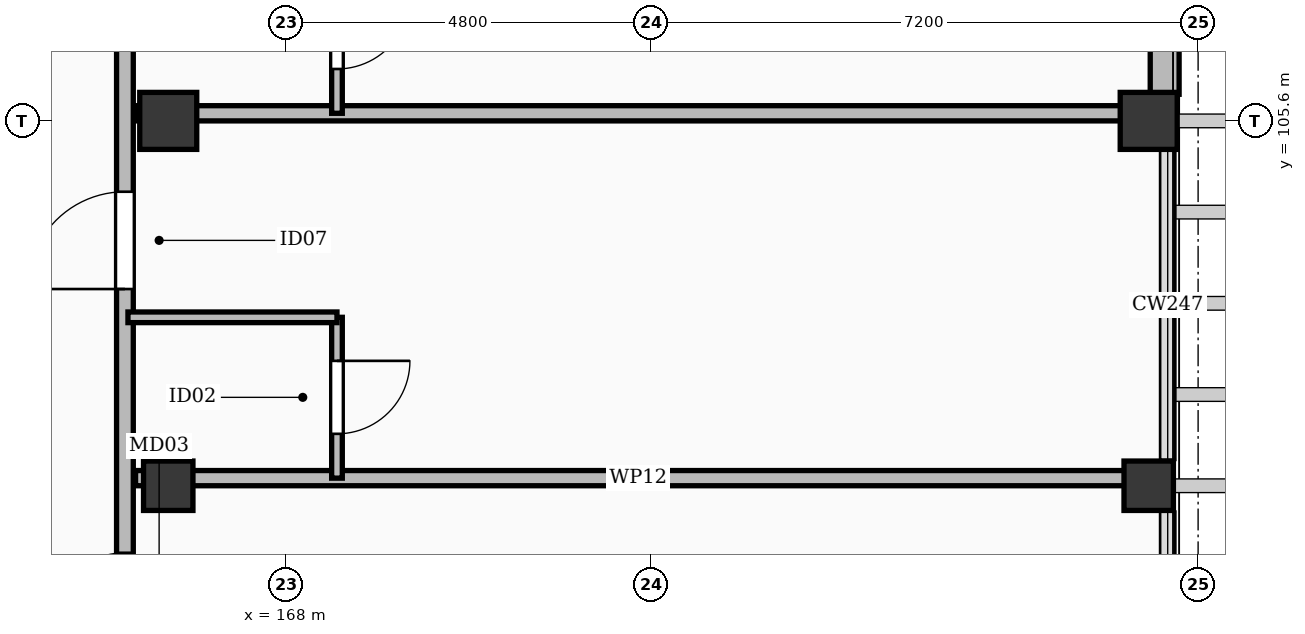
"""IFC4 building model, lengths in metres.
Left out: names, types, materials, properties, quantities, classifications, styles, units other than length and angle.
Written with IfcOpenShell. Run it as: python <this file> out.ifc"""

import sys

from ifc_helpers import new_model, si_unit, direction, frame, frame_2d, origin, origin_2d, place, context, subcontext, project, spatial, rectangle, extrude, element, fill, save


model = new_model("IFC4")
c1 = context("Model", 3, precision=1e-05, world=origin(), true_north=direction((0.0, 1.0)))
c2 = subcontext(c1, "Body", "Model", "MODEL_VIEW")
j1 = project(units=[si_unit("LENGTHUNIT", "METRE"), si_unit("PLANEANGLEUNIT", "RADIAN")], contexts=[c1])
p1 = place(None, origin())
s1 = spatial("IfcSite", under=j1, at=p1, CompositionType="ELEMENT")
p2 = place(p1, origin())
s2 = spatial("IfcBuilding", under=s1, at=p2, CompositionType="ELEMENT")
p3 = place(p2, frame((0.0, 0.0, 28.2)))
s3 = spatial("IfcBuildingStorey", under=s2, at=p3, CompositionType="ELEMENT", Elevation=28.2)
for number, where, z_axis, x_axis in (
    (1, (166.45, 105.6, 0.0), (0.0, 0.0, 1.0), (1.0, 0.0, 0.0)),
    (2, (179.35, 105.6, 0.0), (0.0, 0.0, 1.0), (1.0, 0.0, 0.0)),
):
    element("IfcColumn", number, at=place(p3, frame(where, z_axis=z_axis, x_axis=x_axis)), inside=s3, PredefinedType="COLUMN", context=c2, shape_type="SweptSolid", body=[
        extrude(rectangle(XDim=0.75, YDim=0.75, at=origin_2d()), origin(), (0.0, 0.0, 1.0), 3.6),
    ])
for number, where, z_axis, x_axis in (
    (3, (166.45, 100.8, 0.0), (0.0, 0.0, 1.0), (1.0, 0.0, 0.0)),
    (4, (179.35, 100.8, 0.0), (0.0, 0.0, 1.0), (1.0, 0.0, 0.0)),
):
    element("IfcColumn", number, at=place(p3, frame(where, z_axis=z_axis, x_axis=x_axis)), inside=s3, PredefinedType="COLUMN", context=c2, shape_type="SweptSolid", body=[
        extrude(rectangle(XDim=0.65, YDim=0.65, at=origin_2d()), origin(), (0.0, 0.0, 1.0), 3.6),
    ])
p4 = place(p3, frame((179.56, 110.1, 0.0), z_axis=(0.0, 0.0, 1.0), x_axis=(0.0, -1.0, 0.0)))
e5 = element("IfcWall", 5, at=p4, inside=s3, PredefinedType="SOLIDWALL", context=c2, shape_type="SweptSolid", body=[
    extrude(rectangle(XDim=4.15, YDim=0.38, at=frame_2d((2.075, 0.0))), origin(), (0.0, 0.0, 1.0), 2.582),
])
p5 = place(p4, frame((1.1, 0.0, 0.55)))
e6 = element("IfcOpeningElement", 6, at=p5, cuts=e5, PredefinedType="OPENING", context=c2, shape_type="SweptSolid", body=[
    extrude(rectangle(XDim=1.95, YDim=1.77, at=frame_2d((0.975, 0.885))), frame((0.0, 0.202, 0.0), z_axis=(0.0, -1.0, 0.0), x_axis=(1.0, 0.0, 0.0)), (0.0, 0.0, 1.0), 0.404),
])
p6 = place(p3, frame((165.88, 38.75, 0.0), z_axis=(0.0, 0.0, 1.0), x_axis=(0.0, 1.0, 0.0)))
e7 = element("IfcWall", 7, at=p6, inside=s3, PredefinedType="PARTITIONING", context=c2, shape_type="SweptSolid", body=[
    extrude(rectangle(XDim=86.9, YDim=0.22, at=frame_2d((43.45, 0.0))), origin(), (0.0, 0.0, 1.0), 2.582),
])
p7 = place(p6, frame((0.691, 0.0, 0.0)))
e8 = element("IfcOpeningElement", 8, at=p7, cuts=e7, PredefinedType="OPENING", context=c2, shape_type="SweptSolid", body=[
    extrude(rectangle(XDim=0.98, YDim=2.15, at=frame_2d((0.49, 1.075))), frame((0.0, 0.122, 0.0), z_axis=(0.0, -1.0, 0.0), x_axis=(1.0, 0.0, 0.0)), (0.0, 0.0, 1.0), 0.244),
])
p8 = place(p6, frame((7.038, 0.0, 0.0)))
e9 = element("IfcOpeningElement", 9, at=p8, cuts=e7, PredefinedType="OPENING", context=c2, shape_type="SweptSolid", body=[
    extrude(rectangle(XDim=1.28, YDim=2.16, at=frame_2d((0.64, 1.08))), frame((0.0, 0.122, 0.0), z_axis=(0.0, -1.0, 0.0), x_axis=(1.0, 0.0, 0.0)), (0.0, 0.0, 1.0), 0.244),
])
p9 = place(p6, frame((12.188, 0.0, 0.0)))
e10 = element("IfcOpeningElement", 10, at=p9, cuts=e7, PredefinedType="OPENING", context=c2, shape_type="SweptSolid", body=[
    extrude(rectangle(XDim=0.9, YDim=2.08, at=frame_2d((0.45, 1.04))), frame((0.0, 0.122, 0.0), z_axis=(0.0, -1.0, 0.0), x_axis=(1.0, 0.0, 0.0)), (0.0, 0.0, 1.0), 0.244),
])
p10 = place(p6, frame((16.988, 0.0, 0.0)))
e11 = element("IfcOpeningElement", 11, at=p10, cuts=e7, PredefinedType="OPENING", context=c2, shape_type="SweptSolid", body=[
    extrude(rectangle(XDim=1.05, YDim=2.22, at=frame_2d((0.525, 1.11))), frame((0.0, 0.122, 0.0), z_axis=(0.0, -1.0, 0.0), x_axis=(1.0, 0.0, 0.0)), (0.0, 0.0, 1.0), 0.244),
])
p11 = place(p6, frame((21.788, 0.0, 0.0)))
e12 = element("IfcOpeningElement", 12, at=p11, cuts=e7, PredefinedType="OPENING", context=c2, shape_type="SweptSolid", body=[
    extrude(rectangle(XDim=1.02, YDim=2.2, at=frame_2d((0.51, 1.1))), frame((0.0, 0.122, 0.0), z_axis=(0.0, -1.0, 0.0), x_axis=(1.0, 0.0, 0.0)), (0.0, 0.0, 1.0), 0.244),
])
p12 = place(p6, frame((26.588, 0.0, 0.0)))
e13 = element("IfcOpeningElement", 13, at=p12, cuts=e7, PredefinedType="OPENING", context=c2, shape_type="SweptSolid", body=[
    extrude(rectangle(XDim=1.14, YDim=2.26, at=frame_2d((0.57, 1.13))), frame((0.0, 0.122, 0.0), z_axis=(0.0, -1.0, 0.0), x_axis=(1.0, 0.0, 0.0)), (0.0, 0.0, 1.0), 0.244),
])
p13 = place(p6, frame((31.388, 0.0, 0.0)))
e14 = element("IfcOpeningElement", 14, at=p13, cuts=e7, PredefinedType="OPENING", context=c2, shape_type="SweptSolid", body=[
    extrude(rectangle(XDim=0.98, YDim=2.15, at=frame_2d((0.49, 1.075))), frame((0.0, 0.122, 0.0), z_axis=(0.0, -1.0, 0.0), x_axis=(1.0, 0.0, 0.0)), (0.0, 0.0, 1.0), 0.244),
])
p14 = place(p6, frame((35.838, 0.0, 0.0)))
e15 = element("IfcOpeningElement", 15, at=p14, cuts=e7, PredefinedType="OPENING", context=c2, shape_type="SweptSolid", body=[
    extrude(rectangle(XDim=1.28, YDim=2.16, at=frame_2d((0.64, 1.08))), frame((0.0, 0.122, 0.0), z_axis=(0.0, -1.0, 0.0), x_axis=(1.0, 0.0, 0.0)), (0.0, 0.0, 1.0), 0.244),
])
p15 = place(p6, frame((40.988, 0.0, 0.0)))
e16 = element("IfcOpeningElement", 16, at=p15, cuts=e7, PredefinedType="OPENING", context=c2, shape_type="SweptSolid", body=[
    extrude(rectangle(XDim=0.9, YDim=2.08, at=frame_2d((0.45, 1.04))), frame((0.0, 0.122, 0.0), z_axis=(0.0, -1.0, 0.0), x_axis=(1.0, 0.0, 0.0)), (0.0, 0.0, 1.0), 0.244),
])
p16 = place(p6, frame((45.788, 0.0, 0.0)))
e17 = element("IfcOpeningElement", 17, at=p16, cuts=e7, PredefinedType="OPENING", context=c2, shape_type="SweptSolid", body=[
    extrude(rectangle(XDim=1.05, YDim=2.22, at=frame_2d((0.525, 1.11))), frame((0.0, 0.122, 0.0), z_axis=(0.0, -1.0, 0.0), x_axis=(1.0, 0.0, 0.0)), (0.0, 0.0, 1.0), 0.244),
])
p17 = place(p6, frame((50.588, 0.0, 0.0)))
e18 = element("IfcOpeningElement", 18, at=p17, cuts=e7, PredefinedType="OPENING", context=c2, shape_type="SweptSolid", body=[
    extrude(rectangle(XDim=1.02, YDim=2.2, at=frame_2d((0.51, 1.1))), frame((0.0, 0.122, 0.0), z_axis=(0.0, -1.0, 0.0), x_axis=(1.0, 0.0, 0.0)), (0.0, 0.0, 1.0), 0.244),
])
p18 = place(p6, frame((55.388, 0.0, 0.0)))
e19 = element("IfcOpeningElement", 19, at=p18, cuts=e7, PredefinedType="OPENING", context=c2, shape_type="SweptSolid", body=[
    extrude(rectangle(XDim=1.14, YDim=2.26, at=frame_2d((0.57, 1.13))), frame((0.0, 0.122, 0.0), z_axis=(0.0, -1.0, 0.0), x_axis=(1.0, 0.0, 0.0)), (0.0, 0.0, 1.0), 0.244),
])
p19 = place(p6, frame((60.188, 0.0, 0.0)))
e20 = element("IfcOpeningElement", 20, at=p19, cuts=e7, PredefinedType="OPENING", context=c2, shape_type="SweptSolid", body=[
    extrude(rectangle(XDim=0.98, YDim=2.15, at=frame_2d((0.49, 1.075))), frame((0.0, 0.122, 0.0), z_axis=(0.0, -1.0, 0.0), x_axis=(1.0, 0.0, 0.0)), (0.0, 0.0, 1.0), 0.244),
])
p20 = place(p6, frame((64.638, 0.0, 0.0)))
e21 = element("IfcOpeningElement", 21, at=p20, cuts=e7, PredefinedType="OPENING", context=c2, shape_type="SweptSolid", body=[
    extrude(rectangle(XDim=1.28, YDim=2.16, at=frame_2d((0.64, 1.08))), frame((0.0, 0.122, 0.0), z_axis=(0.0, -1.0, 0.0), x_axis=(1.0, 0.0, 0.0)), (0.0, 0.0, 1.0), 0.244),
])
p21 = place(p6, frame((69.788, 0.0, 0.0)))
e22 = element("IfcOpeningElement", 22, at=p21, cuts=e7, PredefinedType="OPENING", context=c2, shape_type="SweptSolid", body=[
    extrude(rectangle(XDim=0.9, YDim=2.08, at=frame_2d((0.45, 1.04))), frame((0.0, 0.122, 0.0), z_axis=(0.0, -1.0, 0.0), x_axis=(1.0, 0.0, 0.0)), (0.0, 0.0, 1.0), 0.244),
])
p22 = place(p6, frame((74.588, 0.0, 0.0)))
e23 = element("IfcOpeningElement", 23, at=p22, cuts=e7, PredefinedType="OPENING", context=c2, shape_type="SweptSolid", body=[
    extrude(rectangle(XDim=1.05, YDim=2.22, at=frame_2d((0.525, 1.11))), frame((0.0, 0.122, 0.0), z_axis=(0.0, -1.0, 0.0), x_axis=(1.0, 0.0, 0.0)), (0.0, 0.0, 1.0), 0.244),
])
p23 = place(p6, frame((79.388, 0.0, 0.0)))
e24 = element("IfcOpeningElement", 24, at=p23, cuts=e7, PredefinedType="OPENING", context=c2, shape_type="SweptSolid", body=[
    extrude(rectangle(XDim=1.02, YDim=2.2, at=frame_2d((0.51, 1.1))), frame((0.0, 0.122, 0.0), z_axis=(0.0, -1.0, 0.0), x_axis=(1.0, 0.0, 0.0)), (0.0, 0.0, 1.0), 0.244),
])
p24 = place(p6, frame((84.188, 0.0, 0.0)))
e25 = element("IfcOpeningElement", 25, at=p24, cuts=e7, PredefinedType="OPENING", context=c2, shape_type="SweptSolid", body=[
    extrude(rectangle(XDim=1.14, YDim=2.26, at=frame_2d((0.57, 1.13))), frame((0.0, 0.122, 0.0), z_axis=(0.0, -1.0, 0.0), x_axis=(1.0, 0.0, 0.0)), (0.0, 0.0, 1.0), 0.244),
])
p25 = place(p3, frame((166.02, 100.9, 0.0), z_axis=(0.0, 0.0, 1.0), x_axis=(1.0, 0.0, 0.0)))
e26 = element("IfcWall", 26, at=p25, inside=s3, PredefinedType="PARTITIONING", context=c2, shape_type="SweptSolid", body=[
    extrude(rectangle(XDim=13.23, YDim=0.2, at=frame_2d((6.615, 0.0))), origin(), (0.0, 0.0, 1.0), 2.582),
])
p26 = place(p3, frame((168.67, 100.9, 0.0), z_axis=(0.0, 0.0, 1.0), x_axis=(0.0, 1.0, 0.0)))
e27 = element("IfcWall", 27, at=p26, inside=s3, PredefinedType="PARTITIONING", context=c2, shape_type="SweptSolid", body=[
    extrude(rectangle(XDim=2.116, YDim=0.14, at=frame_2d((1.058, 0.0))), origin(), (0.0, 0.0, 1.0), 2.682),
])
p27 = place(p26, frame((0.583, 0.0, 0.0)))
e28 = element("IfcOpeningElement", 28, at=p27, cuts=e27, PredefinedType="OPENING", context=c2, shape_type="SweptSolid", body=[
    extrude(rectangle(XDim=0.96, YDim=2.12, at=frame_2d((0.48, 1.06))), frame((0.0, 0.082, 0.0), z_axis=(0.0, -1.0, 0.0), x_axis=(1.0, 0.0, 0.0)), (0.0, 0.0, 1.0), 0.164),
])
p28 = place(p3, frame((165.92, 103.016, 0.0), z_axis=(0.0, 0.0, 1.0), x_axis=(1.0, 0.0, 0.0)))
e29 = element("IfcWall", 29, at=p28, inside=s3, PredefinedType="PARTITIONING", context=c2, shape_type="SweptSolid", body=[
    extrude(rectangle(XDim=2.75, YDim=0.14, at=frame_2d((1.375, 0.0))), origin(), (0.0, 0.0, 1.0), 2.682),
])
p29 = place(p3, frame((166.02, 105.7, 0.0), z_axis=(0.0, 0.0, 1.0), x_axis=(1.0, 0.0, 0.0)))
e30 = element("IfcWall", 30, at=p29, inside=s3, PredefinedType="PARTITIONING", context=c2, shape_type="SweptSolid", body=[
    extrude(rectangle(XDim=13.23, YDim=0.2, at=frame_2d((6.615, 0.0))), origin(), (0.0, 0.0, 1.0), 2.582),
])
p30 = place(p3, frame((168.67, 105.7, 0.0), z_axis=(0.0, 0.0, 1.0), x_axis=(0.0, 1.0, 0.0)))
e31 = element("IfcWall", 31, at=p30, inside=s3, PredefinedType="PARTITIONING", context=c2, shape_type="SweptSolid", body=[
    extrude(rectangle(XDim=2.116, YDim=0.14, at=frame_2d((1.058, 0.0))), origin(), (0.0, 0.0, 1.0), 2.682),
])
p31 = place(p30, frame((0.583, 0.0, 0.0)))
e32 = element("IfcOpeningElement", 32, at=p31, cuts=e31, PredefinedType="OPENING", context=c2, shape_type="SweptSolid", body=[
    extrude(rectangle(XDim=0.96, YDim=2.12, at=frame_2d((0.48, 1.06))), frame((0.0, 0.082, 0.0), z_axis=(0.0, -1.0, 0.0), x_axis=(1.0, 0.0, 0.0)), (0.0, 0.0, 1.0), 0.164),
])
p32 = place(p19, origin())
e33 = element("IfcDoor", 33, at=p32, inside=s3, OperationType="SINGLE_SWING_LEFT", PredefinedType="DOOR", context=c2, shape_type="SweptSolid", body=[
    extrude(rectangle(XDim=0.98, YDim=2.15, at=frame_2d((0.49, 1.075))), frame((0.0, 0.025, 0.0), z_axis=(0.0, -1.0, 0.0), x_axis=(1.0, 0.0, 0.0)), (0.0, 0.0, 1.0), 0.05),
])
fill(e20, e33)
p33 = place(p20, origin())
e34 = element("IfcDoor", 34, at=p33, inside=s3, OperationType="SINGLE_SWING_LEFT", PredefinedType="DOOR", context=c2, shape_type="SweptSolid", body=[
    extrude(rectangle(XDim=1.28, YDim=2.16, at=frame_2d((0.64, 1.08))), frame((0.0, 0.025, 0.0), z_axis=(0.0, -1.0, 0.0), x_axis=(1.0, 0.0, 0.0)), (0.0, 0.0, 1.0), 0.05),
])
fill(e21, e34)
p34 = place(p27, frame((0.96, 0.0, 0.0), z_axis=(0.0, 0.0, 1.0), x_axis=(-1.0, 0.0, 0.0)))
e35 = element("IfcDoor", 35, at=p34, inside=s3, OperationType="SINGLE_SWING_RIGHT", PredefinedType="DOOR", context=c2, shape_type="SweptSolid", body=[
    extrude(rectangle(XDim=0.96, YDim=2.12, at=frame_2d((0.48, 1.06))), frame((0.0, 0.025, 0.0), z_axis=(0.0, -1.0, 0.0), x_axis=(1.0, 0.0, 0.0)), (0.0, 0.0, 1.0), 0.05),
])
fill(e28, e35)
p35 = place(p31, frame((0.96, 0.0, 0.0), z_axis=(0.0, 0.0, 1.0), x_axis=(-1.0, 0.0, 0.0)))
e36 = element("IfcDoor", 36, at=p35, inside=s3, OperationType="SINGLE_SWING_RIGHT", PredefinedType="DOOR", context=c2, shape_type="SweptSolid", body=[
    extrude(rectangle(XDim=0.96, YDim=2.12, at=frame_2d((0.48, 1.06))), frame((0.0, 0.025, 0.0), z_axis=(0.0, -1.0, 0.0), x_axis=(1.0, 0.0, 0.0)), (0.0, 0.0, 1.0), 0.05),
])
fill(e32, e36)
save(model, sys.argv[1])
